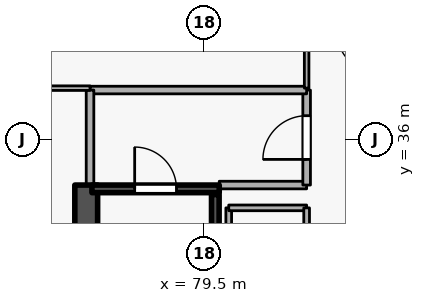
"""IFC4 building model, lengths in metres.
Left out: names, types, materials, properties, quantities, classifications, styles, units other than length and angle.
Written with IfcOpenShell. Run it as: python <this file> out.ifc"""

import sys

from ifc_helpers import new_model, si_unit, direction, frame, frame_2d, origin, place, context, subcontext, project, spatial, rectangle, extrude, element, fill, save


model = new_model("IFC4")
c1 = context("Model", 3, precision=1e-05, world=origin(), true_north=direction((0.0, 1.0)))
c2 = subcontext(c1, "Body", "Model", "MODEL_VIEW")
j1 = project(units=[si_unit("LENGTHUNIT", "METRE"), si_unit("PLANEANGLEUNIT", "RADIAN")], contexts=[c1])
p1 = place(None, origin())
s1 = spatial("IfcSite", under=j1, at=p1, CompositionType="ELEMENT")
p2 = place(p1, origin())
s2 = spatial("IfcBuilding", under=s1, at=p2, CompositionType="ELEMENT")
p3 = place(p2, frame((0.0, 0.0, 42.3)))
s3 = spatial("IfcBuildingStorey", under=s2, at=p3, CompositionType="ELEMENT", Elevation=42.3)
p4 = place(p3, frame((76.4, 19.2, 0.0), z_axis=(0.0, 0.0, 1.0), x_axis=(0.0, 1.0, 0.0)))
e1 = element("IfcWall", 1, at=p4, inside=s3, PredefinedType="SHEAR", context=c2, shape_type="SweptSolid", body=[
    extrude(rectangle(XDim=15.6, YDim=0.6, at=frame_2d((7.8, 0.0))), origin(), (0.0, 0.0, 1.0), 3.6),
])
p5 = place(p3, frame((76.55, 34.7, 0.0), z_axis=(0.0, 0.0, 1.0), x_axis=(1.0, 0.0, 0.0)))
e2 = element("IfcWall", 2, at=p5, inside=s3, PredefinedType="SHEAR", context=c2, shape_type="SweptSolid", body=[
    extrude(rectangle(XDim=3.35, YDim=0.2, at=frame_2d((1.675, 0.0))), origin(), (0.0, 0.0, 1.0), 3.6),
])
p6 = place(p5, frame((1.125, 0.0, 0.0)))
e3 = element("IfcOpeningElement", 3, at=p6, cuts=e2, PredefinedType="OPENING", context=c2, shape_type="SweptSolid", body=[
    extrude(rectangle(XDim=1.1, YDim=2.1, at=frame_2d((0.55, 1.05))), frame((0.0, 0.11, 0.0), z_axis=(0.0, -1.0, 0.0), x_axis=(1.0, 0.0, 0.0)), (0.0, 0.0, 1.0), 0.22),
])
p7 = place(p3, frame((79.797, 27.45, 0.0), z_axis=(0.0, 0.0, 1.0), x_axis=(0.0, 1.0, 0.0)))
e4 = element("IfcWall", 4, at=p7, inside=s3, PredefinedType="SHEAR", context=c2, shape_type="SweptSolid", body=[
    extrude(rectangle(XDim=7.1, YDim=0.2, at=frame_2d((3.55, 0.0))), origin(), (0.0, 0.0, 1.0), 3.6),
])
p8 = place(p3, frame((79.9, 34.8, 0.0), z_axis=(0.0, 0.0, 1.0), x_axis=(1.0, 0.0, 0.0)))
e5 = element("IfcWall", 5, at=p8, inside=s3, PredefinedType="STANDARD", context=c2, shape_type="SweptSolid", body=[
    extrude(rectangle(XDim=2.3, YDim=0.2, at=frame_2d((1.15, 0.0))), origin(), (0.0, 0.0, 1.0), 2.545),
])
p9 = place(p3, frame((82.2, 34.8, 0.0), z_axis=(0.0, 0.0, 1.0), x_axis=(0.0, 1.0, 0.0)))
e6 = element("IfcWall", 6, at=p9, inside=s3, PredefinedType="STANDARD", context=c2, shape_type="SweptSolid", body=[
    extrude(rectangle(XDim=2.5, YDim=0.2, at=frame_2d((1.25, 0.0))), origin(), (0.0, 0.0, 1.0), 3.34),
])
p10 = place(p9, frame((0.675, 0.0, 0.0)))
e7 = element("IfcOpeningElement", 7, at=p10, cuts=e6, PredefinedType="OPENING", context=c2, shape_type="SweptSolid", body=[
    extrude(rectangle(XDim=1.15, YDim=2.1, at=frame_2d((0.575, 1.05))), frame((0.0, 0.11, 0.0), z_axis=(0.0, -1.0, 0.0), x_axis=(1.0, 0.0, 0.0)), (0.0, 0.0, 1.0), 0.22),
])
p11 = place(p3, frame((82.2, 37.3, 0.0), z_axis=(0.0, 0.0, 1.0), x_axis=(-1.0, 0.0, 0.0)))
e8 = element("IfcWall", 8, at=p11, inside=s3, PredefinedType="STANDARD", context=c2, shape_type="SweptSolid", body=[
    extrude(rectangle(XDim=5.7, YDim=0.2, at=frame_2d((2.85, 0.0))), origin(), (0.0, 0.0, 1.0), 3.34),
])
p12 = place(p3, frame((76.5, 37.3, 0.0), z_axis=(0.0, 0.0, 1.0), x_axis=(0.0, -1.0, 0.0)))
e9 = element("IfcWall", 9, at=p12, inside=s3, PredefinedType="STANDARD", context=c2, shape_type="SweptSolid", body=[
    extrude(rectangle(XDim=2.5, YDim=0.2, at=frame_2d((1.25, 0.0))), origin(), (0.0, 0.0, 1.0), 3.34),
])
p13 = place(p3, frame((80.15, 31.85, 0.0), z_axis=(0.0, 0.0, 1.0), x_axis=(0.0, 1.0, 0.0)))
e10 = element("IfcWall", 10, at=p13, inside=s3, PredefinedType="PARTITIONING", context=c2, shape_type="SweptSolid", body=[
    extrude(rectangle(XDim=2.35, YDim=0.15, at=frame_2d((1.175, 0.0))), origin(), (0.0, 0.0, 1.0), 3.34),
])
p14 = place(p3, frame((80.15, 34.2, 0.0), z_axis=(0.0, 0.0, 1.0), x_axis=(1.0, 0.0, 0.0)))
e11 = element("IfcWall", 11, at=p14, inside=s3, PredefinedType="PARTITIONING", context=c2, shape_type="SweptSolid", body=[
    extrude(rectangle(XDim=2.05, YDim=0.15, at=frame_2d((1.025, 0.0))), origin(), (0.0, 0.0, 1.0), 2.545),
])
p15 = place(p3, frame((82.2, 34.2, 0.0), z_axis=(0.0, 0.0, 1.0), x_axis=(0.0, -1.0, 0.0)))
e12 = element("IfcWall", 12, at=p15, inside=s3, PredefinedType="PARTITIONING", context=c2, shape_type="SweptSolid", body=[
    extrude(rectangle(XDim=2.35, YDim=0.15, at=frame_2d((1.175, 0.0))), origin(), (0.0, 0.0, 1.0), 3.34),
])
p16 = place(p15, frame((0.715, 0.0, 0.0)))
e13 = element("IfcOpeningElement", 13, at=p16, cuts=e12, PredefinedType="OPENING", context=c2, shape_type="SweptSolid", body=[
    extrude(rectangle(XDim=0.92, YDim=2.08, at=frame_2d((0.46, 1.04))), frame((0.0, 0.085, 0.0), z_axis=(0.0, -1.0, 0.0), x_axis=(1.0, 0.0, 0.0)), (0.0, 0.0, 1.0), 0.17),
])
p17 = place(p3, frame((82.2, 39.25, 0.0), z_axis=(0.0, 0.0, 1.0), x_axis=(0.0, -1.0, 0.0)))
e14 = element("IfcWall", 14, at=p17, inside=s3, PredefinedType="PARTITIONING", context=c2, shape_type="SweptSolid", body=[
    extrude(rectangle(XDim=1.9, YDim=0.12, at=frame_2d((0.95, 0.0))), origin(), (0.0, 0.0, 1.0), 3.34),
])
p18 = place(p3, frame((76.5, 37.35, 0.0), z_axis=(0.0, 0.0, 1.0), x_axis=(-1.0, 0.0, 0.0)))
e15 = element("IfcWall", 15, at=p18, inside=s3, PredefinedType="PARTITIONING", context=c2, shape_type="SweptSolid", body=[
    extrude(rectangle(XDim=6.22, YDim=0.12, at=frame_2d((3.11, 0.0))), origin(), (0.0, 0.0, 1.0), 3.34),
])
p19 = place(p6, origin())
e16 = element("IfcDoor", 16, at=p19, inside=s3, OperationType="SINGLE_SWING_LEFT", PredefinedType="DOOR", context=c2, shape_type="SweptSolid", body=[
    extrude(rectangle(XDim=1.1, YDim=2.1, at=frame_2d((0.55, 1.05))), frame((0.0, 0.025, 0.0), z_axis=(0.0, -1.0, 0.0), x_axis=(1.0, 0.0, 0.0)), (0.0, 0.0, 1.0), 0.05),
])
fill(e3, e16)
p20 = place(p10, origin())
e17 = element("IfcDoor", 17, at=p20, inside=s3, OperationType="SINGLE_SWING_LEFT", PredefinedType="DOOR", context=c2, shape_type="SweptSolid", body=[
    extrude(rectangle(XDim=1.15, YDim=2.1, at=frame_2d((0.575, 1.05))), frame((0.0, 0.025, 0.0), z_axis=(0.0, -1.0, 0.0), x_axis=(1.0, 0.0, 0.0)), (0.0, 0.0, 1.0), 0.05),
])
fill(e7, e17)
save(model, sys.argv[1])
